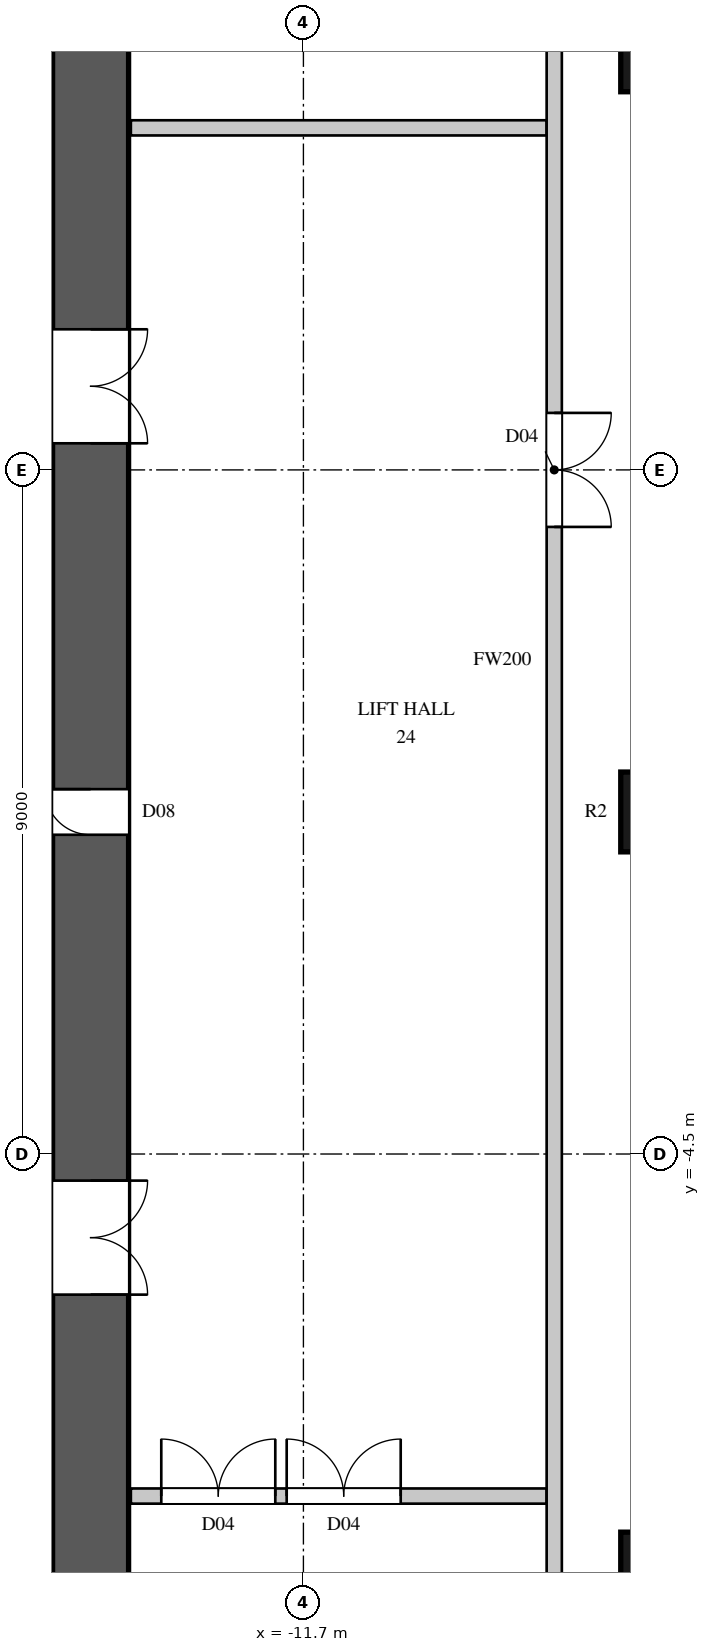
"""IFC4 building model, lengths in metres.
Left out: names, types, materials, properties, quantities, classifications, styles, units other than length and angle.
Written with IfcOpenShell. Run it as: python <this file> out.ifc"""

import sys

from ifc_helpers import new_model, si_unit, direction, frame, frame_2d, origin, origin_2d, place, context, subcontext, project, spatial, rectangle, circle, extrude, element, fill, save


model = new_model("IFC4")
c1 = context("Model", 3, precision=1e-05, world=origin(), true_north=direction((0.0, 1.0)))
c2 = subcontext(c1, "Body", "Model", "MODEL_VIEW")
j1 = project(units=[si_unit("LENGTHUNIT", "METRE"), si_unit("PLANEANGLEUNIT", "RADIAN")], contexts=[c1])
p1 = place(None, origin())
s1 = spatial("IfcSite", under=j1, at=p1, CompositionType="ELEMENT")
p2 = place(p1, origin())
s2 = spatial("IfcBuilding", under=s1, at=p2, CompositionType="ELEMENT")
p3 = place(p2, frame((0.0, 0.0, 116.7)))
s3 = spatial("IfcBuildingStorey", under=s2, at=p3, CompositionType="ELEMENT", Elevation=116.7)
for number, where, z_axis, x_axis in (
    (1, (-7.0, -10.0, 0.0), (0.0, 0.0, 1.0), (1.0, 0.0, 0.0)),
    (2, (-7.0, 0.0, 0.0), (0.0, 0.0, 1.0), (1.0, 0.0, 0.0)),
    (3, (-7.0, 10.0, 0.0), (0.0, 0.0, 1.0), (1.0, 0.0, 0.0)),
):
    element("IfcColumn", number, at=place(p3, frame(where, z_axis=z_axis, x_axis=x_axis)), inside=s3, PredefinedType="COLUMN", context=c2, shape_type="SweptSolid", body=[
        extrude(circle(Radius=0.525, at=origin_2d()), origin(), (0.0, 0.0, 1.0), 3.6),
    ])
p4 = place(p3, frame((-14.5, -14.8, 0.0), z_axis=(0.0, 0.0, 1.0), x_axis=(0.0, 1.0, 0.0)))
e4 = element("IfcWall", 4, at=p4, inside=s3, PredefinedType="SHEAR", context=c2, shape_type="SweptSolid", body=[
    extrude(rectangle(XDim=29.6, YDim=1.0, at=frame_2d((14.8, 0.0))), origin(), (0.0, 0.0, 1.0), 3.6),
])
p5 = place(p4, frame((8.45, 0.0, 0.0)))
e5 = element("IfcOpeningElement", 5, at=p5, cuts=e4, PredefinedType="OPENING", context=c2, shape_type="SweptSolid", body=[
    extrude(rectangle(XDim=1.5, YDim=2.4, at=frame_2d((0.75, 1.2))), frame((0.0, 0.51, 0.0), z_axis=(0.0, -1.0, 0.0), x_axis=(1.0, 0.0, 0.0)), (0.0, 0.0, 1.0), 1.02),
])
p6 = place(p4, frame((19.65, 0.0, 0.0)))
e6 = element("IfcOpeningElement", 6, at=p6, cuts=e4, PredefinedType="OPENING", context=c2, shape_type="SweptSolid", body=[
    extrude(rectangle(XDim=1.5, YDim=2.4, at=frame_2d((0.75, 1.2))), frame((0.0, 0.51, 0.0), z_axis=(0.0, -1.0, 0.0), x_axis=(1.0, 0.0, 0.0)), (0.0, 0.0, 1.0), 1.02),
])
p7 = place(p4, frame((14.5, 0.0, 0.0)))
e7 = element("IfcOpeningElement", 7, at=p7, cuts=e4, PredefinedType="OPENING", context=c2, shape_type="SweptSolid", body=[
    extrude(rectangle(XDim=0.6, YDim=2.0, at=frame_2d((0.3, 1.0))), frame((0.0, 0.51, 0.0), z_axis=(0.0, -1.0, 0.0), x_axis=(1.0, 0.0, 0.0)), (0.0, 0.0, 1.0), 1.02),
])
p8 = place(p3, frame((-13.97, -9.0, 0.0), z_axis=(0.0, 0.0, 1.0), x_axis=(1.0, 0.0, 0.0)))
e8 = element("IfcWall", 8, at=p8, inside=s3, PredefinedType="PARTITIONING", context=c2, shape_type="SweptSolid", body=[
    extrude(rectangle(XDim=5.47, YDim=0.2, at=frame_2d((2.735, 0.0))), origin(), (0.0, 0.0, 1.0), 3.3),
])
p9 = place(p8, frame((0.4, 0.0, 0.0)))
e9 = element("IfcOpeningElement", 9, at=p9, cuts=e8, PredefinedType="OPENING", context=c2, shape_type="SweptSolid", body=[
    extrude(rectangle(XDim=1.5, YDim=2.2, at=frame_2d((0.75, 1.1))), frame((0.0, 0.11, 0.0), z_axis=(0.0, -1.0, 0.0), x_axis=(1.0, 0.0, 0.0)), (0.0, 0.0, 1.0), 0.22),
])
p10 = place(p8, frame((2.05, 0.0, 0.0)))
e10 = element("IfcOpeningElement", 10, at=p10, cuts=e8, PredefinedType="OPENING", context=c2, shape_type="SweptSolid", body=[
    extrude(rectangle(XDim=1.5, YDim=2.2, at=frame_2d((0.75, 1.1))), frame((0.0, 0.11, 0.0), z_axis=(0.0, -1.0, 0.0), x_axis=(1.0, 0.0, 0.0)), (0.0, 0.0, 1.0), 0.22),
])
p11 = place(p3, frame((-13.97, 9.0, 0.0), z_axis=(0.0, 0.0, 1.0), x_axis=(1.0, 0.0, 0.0)))
e11 = element("IfcWall", 11, at=p11, inside=s3, PredefinedType="PARTITIONING", context=c2, shape_type="SweptSolid", body=[
    extrude(rectangle(XDim=5.47, YDim=0.2, at=frame_2d((2.735, 0.0))), origin(), (0.0, 0.0, 1.0), 3.3),
])
p12 = place(p3, frame((-8.4, -11.3, 0.0), z_axis=(0.0, 0.0, 1.0), x_axis=(0.0, 1.0, 0.0)))
e12 = element("IfcWall", 12, at=p12, inside=s3, PredefinedType="PARTITIONING", context=c2, shape_type="SweptSolid", body=[
    extrude(rectangle(XDim=26.6, YDim=0.2, at=frame_2d((13.3, 0.0))), origin(), (0.0, 0.0, 1.0), 3.3),
])
p13 = place(p12, frame((15.05, 0.0, 0.0)))
e13 = element("IfcOpeningElement", 13, at=p13, cuts=e12, PredefinedType="OPENING", context=c2, shape_type="SweptSolid", body=[
    extrude(rectangle(XDim=1.5, YDim=2.2, at=frame_2d((0.75, 1.1))), frame((0.0, 0.11, 0.0), z_axis=(0.0, -1.0, 0.0), x_axis=(1.0, 0.0, 0.0)), (0.0, 0.0, 1.0), 0.22),
])
p14 = place(p12, frame((25.55, 0.0, 0.0)))
e14 = element("IfcOpeningElement", 14, at=p14, cuts=e12, PredefinedType="OPENING", context=c2, shape_type="SweptSolid", body=[
    extrude(rectangle(XDim=0.9, YDim=2.2, at=frame_2d((0.45, 1.1))), frame((0.0, 0.11, 0.0), z_axis=(0.0, -1.0, 0.0), x_axis=(1.0, 0.0, 0.0)), (0.0, 0.0, 1.0), 0.22),
])
p15 = place(p13, origin())
e15 = element("IfcDoor", 15, at=p15, inside=s3, OperationType="DOUBLE_DOOR_SINGLE_SWING", PredefinedType="DOOR", context=c2, shape_type="SweptSolid", body=[
    extrude(rectangle(XDim=1.5, YDim=2.2, at=frame_2d((0.75, 1.1))), frame((0.0, 0.025, 0.0), z_axis=(0.0, -1.0, 0.0), x_axis=(1.0, 0.0, 0.0)), (0.0, 0.0, 1.0), 0.05),
])
fill(e13, e15)
p16 = place(p9, origin())
e16 = element("IfcDoor", 16, at=p16, inside=s3, OperationType="DOUBLE_DOOR_SINGLE_SWING", PredefinedType="DOOR", context=c2, shape_type="SweptSolid", body=[
    extrude(rectangle(XDim=1.5, YDim=2.2, at=frame_2d((0.75, 1.1))), frame((0.0, 0.025, 0.0), z_axis=(0.0, -1.0, 0.0), x_axis=(1.0, 0.0, 0.0)), (0.0, 0.0, 1.0), 0.05),
])
fill(e9, e16)
p17 = place(p10, origin())
e17 = element("IfcDoor", 17, at=p17, inside=s3, OperationType="DOUBLE_DOOR_SINGLE_SWING", PredefinedType="DOOR", context=c2, shape_type="SweptSolid", body=[
    extrude(rectangle(XDim=1.5, YDim=2.2, at=frame_2d((0.75, 1.1))), frame((0.0, 0.025, 0.0), z_axis=(0.0, -1.0, 0.0), x_axis=(1.0, 0.0, 0.0)), (0.0, 0.0, 1.0), 0.05),
])
fill(e10, e17)
p18 = place(p5, origin())
e18 = element("IfcDoor", 18, at=p18, inside=s3, OperationType="DOUBLE_DOOR_SINGLE_SWING", PredefinedType="DOOR", context=c2, shape_type="SweptSolid", body=[
    extrude(rectangle(XDim=1.5, YDim=2.4, at=frame_2d((0.75, 1.2))), frame((0.0, -0.445, 0.0), z_axis=(0.0, -1.0, 0.0), x_axis=(1.0, 0.0, 0.0)), (0.0, 0.0, 1.0), 0.05),
])
fill(e5, e18)
p19 = place(p6, origin())
e19 = element("IfcDoor", 19, at=p19, inside=s3, OperationType="DOUBLE_DOOR_SINGLE_SWING", PredefinedType="DOOR", context=c2, shape_type="SweptSolid", body=[
    extrude(rectangle(XDim=1.5, YDim=2.4, at=frame_2d((0.75, 1.2))), frame((0.0, -0.445, 0.0), z_axis=(0.0, -1.0, 0.0), x_axis=(1.0, 0.0, 0.0)), (0.0, 0.0, 1.0), 0.05),
])
fill(e6, e19)
p20 = place(p7, origin())
e20 = element("IfcDoor", 20, at=p20, inside=s3, OperationType="SINGLE_SWING_RIGHT", PredefinedType="DOOR", context=c2, shape_type="SweptSolid", body=[
    extrude(rectangle(XDim=0.6, YDim=2.0, at=frame_2d((0.3, 1.0))), frame((0.0, 0.495, 0.0), z_axis=(0.0, -1.0, 0.0), x_axis=(1.0, 0.0, 0.0)), (0.0, 0.0, 1.0), 0.05),
])
fill(e7, e20)
save(model, sys.argv[1])
